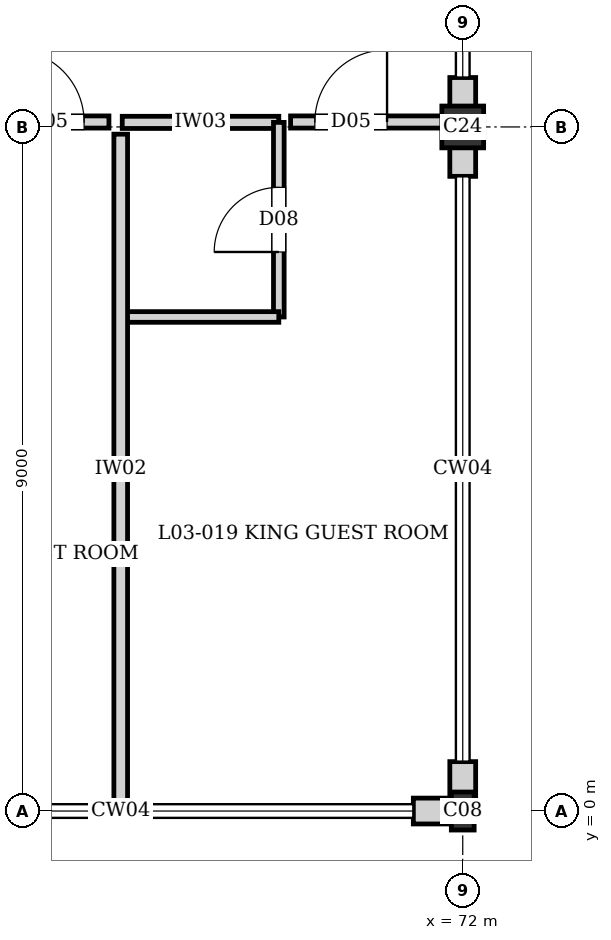
"""IFC4 building model, lengths in metres.
Left out: names, types, materials, properties, quantities, classifications, styles, units other than length and angle.
Written with IfcOpenShell. Run it as: python <this file> out.ifc"""

import sys

from ifc_helpers import new_model, si_unit, direction, frame, frame_2d, origin, origin_2d, place, context, subcontext, project, spatial, rectangle, i_section, extrude, element, fill, save


model = new_model("IFC4")
c1 = context("Model", 3, precision=1e-05, world=origin(), true_north=direction((0.0, 1.0)))
c2 = subcontext(c1, "Body", "Model", "MODEL_VIEW")
j1 = project(units=[si_unit("LENGTHUNIT", "METRE"), si_unit("PLANEANGLEUNIT", "RADIAN")], contexts=[c1])
p1 = place(None, origin())
s1 = spatial("IfcSite", under=j1, at=p1, CompositionType="ELEMENT")
p2 = place(p1, origin())
s2 = spatial("IfcBuilding", under=s1, at=p2, CompositionType="ELEMENT")
p3 = place(p2, frame((0.0, 0.0, 11.52)))
s3 = spatial("IfcBuildingStorey", under=s2, at=p3, CompositionType="ELEMENT", Elevation=11.52)
p4 = place(p3, frame((72.0, 0.0, 0.0), z_axis=(0.0, 0.0, 1.0), x_axis=(1.0, 0.0, 0.0)))
e1 = element("IfcColumn", 1, at=p4, inside=s3, PredefinedType="COLUMN", context=c2, shape_type="SweptSolid", body=[
    extrude(i_section(OverallWidth=0.3, OverallDepth=0.5, WebThickness=0.014, FlangeThickness=0.028, at=origin_2d()), origin(), (0.0, 0.0, 1.0), 3.04),
])
p5 = place(p3, frame((72.0, 9.0, 0.0), z_axis=(0.0, 0.0, 1.0), x_axis=(1.0, 0.0, 0.0)))
e2 = element("IfcColumn", 2, at=p5, inside=s3, PredefinedType="COLUMN", context=c2, shape_type="SweptSolid", body=[
    extrude(rectangle(XDim=0.55, YDim=0.55, at=origin_2d()), origin(), (0.0, 0.0, 1.0), 3.04),
])
p6 = place(p3, frame((72.0, 9.65, 0.0), z_axis=(0.0, 0.0, 1.0), x_axis=(0.0, -1.0, 0.0)))
e3 = element("IfcWall", 3, at=p6, inside=s3, PredefinedType="SOLIDWALL", context=c2, shape_type="SweptSolid", body=[
    extrude(rectangle(XDim=0.65, YDim=0.34, at=frame_2d((0.325, 0.0))), origin(), (0.0, 0.0, 1.0), 2.38),
])
p7 = place(p3, frame((72.0, 9.0, 0.0), z_axis=(0.0, 0.0, 1.0), x_axis=(0.0, -1.0, 0.0)))
e4 = element("IfcWall", 4, at=p7, inside=s3, PredefinedType="SOLIDWALL", context=c2, shape_type="SweptSolid", body=[
    extrude(rectangle(XDim=0.65, YDim=0.34, at=frame_2d((0.325, 0.0))), origin(), (0.0, 0.0, 1.0), 2.42),
])
p8 = place(p3, frame((72.0, 0.65, 0.0), z_axis=(0.0, 0.0, 1.0), x_axis=(0.0, -1.0, 0.0)))
e5 = element("IfcWall", 5, at=p8, inside=s3, PredefinedType="SOLIDWALL", context=c2, shape_type="SweptSolid", body=[
    extrude(rectangle(XDim=0.495, YDim=0.34, at=frame_2d((0.248, 0.0))), origin(), (0.0, 0.0, 1.0), 2.82),
])
p9 = place(p3, frame((72.0, 0.0, 0.0), z_axis=(0.0, 0.0, 1.0), x_axis=(-1.0, 0.0, 0.0)))
e6 = element("IfcWall", 6, at=p9, inside=s3, PredefinedType="SOLIDWALL", context=c2, shape_type="SweptSolid", body=[
    extrude(rectangle(XDim=0.65, YDim=0.34, at=frame_2d((0.325, 0.0))), origin(), (0.0, 0.0, 1.0), 2.55),
])
p10 = place(p3, frame((67.52, 9.06, 0.0), z_axis=(0.0, 0.0, 1.0), x_axis=(1.0, 0.0, 0.0)))
e7 = element("IfcWall", 7, at=p10, inside=s3, PredefinedType="PARTITIONING", context=c2, shape_type="SweptSolid", body=[
    extrude(rectangle(XDim=2.06, YDim=0.16, at=frame_2d((1.03, 0.0))), origin(), (0.0, 0.0, 1.0), 2.38),
])
p11 = place(p3, frame((69.58, 6.5, 0.0), z_axis=(0.0, 0.0, 1.0), x_axis=(0.0, 1.0, 0.0)))
e8 = element("IfcWall", 8, at=p11, inside=s3, PredefinedType="PLUMBINGWALL", context=c2, shape_type="SweptSolid", body=[
    extrude(rectangle(XDim=2.56, YDim=0.14, at=frame_2d((1.28, 0.0))), origin(), (0.0, 0.0, 1.0), 2.82),
])
p12 = place(p11, frame((0.855, 0.0, 0.0)))
e9 = element("IfcOpeningElement", 9, at=p12, cuts=e8, PredefinedType="OPENING", context=c2, shape_type="SweptSolid", body=[
    extrude(rectangle(XDim=0.85, YDim=2.04, at=frame_2d((0.425, 1.02))), frame((0.0, 0.08, 0.0), z_axis=(0.0, -1.0, 0.0), x_axis=(1.0, 0.0, 0.0)), (0.0, 0.0, 1.0), 0.16),
])
p13 = place(p3, frame((67.52, 6.5, 0.0), z_axis=(0.0, 0.0, 1.0), x_axis=(1.0, 0.0, 0.0)))
e10 = element("IfcWall", 10, at=p13, inside=s3, PredefinedType="PLUMBINGWALL", context=c2, shape_type="SweptSolid", body=[
    extrude(rectangle(XDim=2.06, YDim=0.14, at=frame_2d((1.03, 0.0))), origin(), (0.0, 0.0, 1.0), 2.82),
])
p14 = place(p3, frame((67.5, 0.095, 0.0), z_axis=(0.0, 0.0, 1.0), x_axis=(0.0, 1.0, 0.0)))
e11 = element("IfcWall", 11, at=p14, inside=s3, PredefinedType="PARTITIONING", context=c2, shape_type="SweptSolid", body=[
    extrude(rectangle(XDim=8.81, YDim=0.18, at=frame_2d((4.405, 0.0))), origin(), (0.0, 0.0, 1.0), 2.82),
])
p15 = place(p3, frame((65.235, 9.065, 0.0), z_axis=(0.0, 0.0, 1.0), x_axis=(1.0, 0.0, 0.0)))
e12 = element("IfcWall", 12, at=p15, inside=s3, PredefinedType="PARTITIONING", context=c2, shape_type="SweptSolid", body=[
    extrude(rectangle(XDim=2.11, YDim=0.16, at=frame_2d((1.055, 0.0))), origin(), (0.0, 0.0, 1.0), 2.38),
])
p16 = place(p15, frame((0.833, 0.0, 0.0)))
e13 = element("IfcOpeningElement", 13, at=p16, cuts=e12, PredefinedType="OPENING", context=c2, shape_type="SweptSolid", body=[
    extrude(rectangle(XDim=0.95, YDim=2.15, at=frame_2d((0.475, 1.075))), frame((0.0, 0.09, 0.0), z_axis=(0.0, -1.0, 0.0), x_axis=(1.0, 0.0, 0.0)), (0.0, 0.0, 1.0), 0.18),
])
p17 = place(p3, frame((69.735, 9.065, 0.0), z_axis=(0.0, 0.0, 1.0), x_axis=(1.0, 0.0, 0.0)))
e14 = element("IfcWall", 14, at=p17, inside=s3, PredefinedType="PARTITIONING", context=c2, shape_type="SweptSolid", body=[
    extrude(rectangle(XDim=2.09, YDim=0.16, at=frame_2d((1.045, 0.0))), origin(), (0.0, 0.0, 1.0), 2.38),
])
p18 = place(p17, frame((0.319, 0.0, 0.0)))
e15 = element("IfcOpeningElement", 15, at=p18, cuts=e14, PredefinedType="OPENING", context=c2, shape_type="SweptSolid", body=[
    extrude(rectangle(XDim=0.95, YDim=2.15, at=frame_2d((0.475, 1.075))), frame((0.0, 0.09, 0.0), z_axis=(0.0, -1.0, 0.0), x_axis=(1.0, 0.0, 0.0)), (0.0, 0.0, 1.0), 0.18),
])
p19 = place(p12, origin())
e16 = element("IfcDoor", 16, at=p19, inside=s3, OperationType="SINGLE_SWING_LEFT", PredefinedType="DOOR", context=c2, shape_type="SweptSolid", body=[
    extrude(rectangle(XDim=0.85, YDim=2.04, at=frame_2d((0.425, 1.02))), frame((0.0, 0.025, 0.0), z_axis=(0.0, -1.0, 0.0), x_axis=(1.0, 0.0, 0.0)), (0.0, 0.0, 1.0), 0.05),
])
fill(e9, e16)
p20 = place(p16, origin())
e17 = element("IfcDoor", 17, at=p20, inside=s3, OperationType="SINGLE_SWING_LEFT", PredefinedType="DOOR", context=c2, shape_type="SweptSolid", body=[
    extrude(rectangle(XDim=0.95, YDim=2.15, at=frame_2d((0.475, 1.075))), frame((0.0, 0.025, 0.0), z_axis=(0.0, -1.0, 0.0), x_axis=(1.0, 0.0, 0.0)), (0.0, 0.0, 1.0), 0.05),
])
fill(e13, e17)
p21 = place(p18, origin())
e18 = element("IfcDoor", 18, at=p21, inside=s3, OperationType="SINGLE_SWING_RIGHT", PredefinedType="DOOR", context=c2, shape_type="SweptSolid", body=[
    extrude(rectangle(XDim=0.95, YDim=2.15, at=frame_2d((0.475, 1.075))), frame((0.0, 0.025, 0.0), z_axis=(0.0, -1.0, 0.0), x_axis=(1.0, 0.0, 0.0)), (0.0, 0.0, 1.0), 0.05),
])
fill(e15, e18)
save(model, sys.argv[1])
